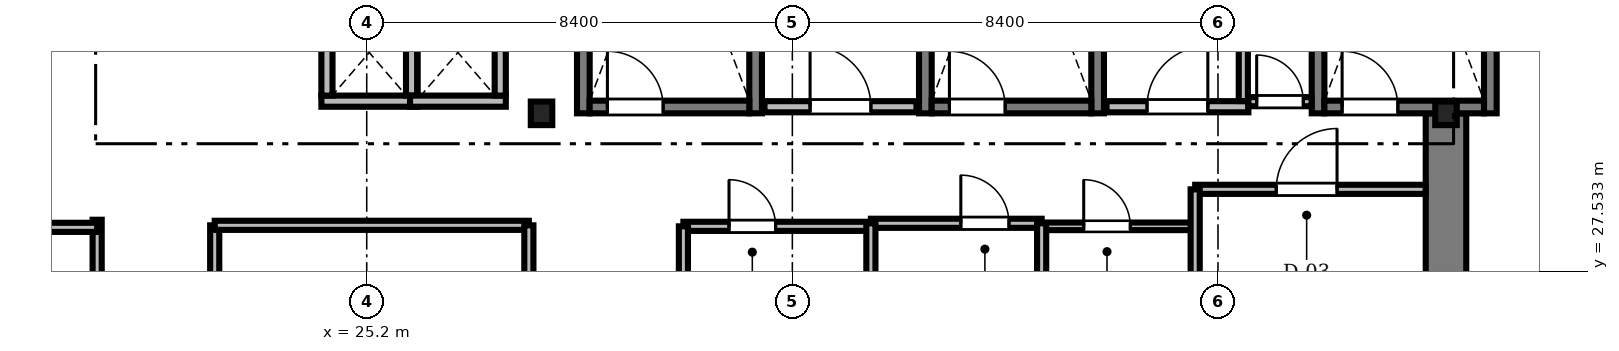
"""IFC4 building model, lengths in metres.
Left out: names, types, materials, properties, quantities, classifications, styles, units other than length and angle.
Written with IfcOpenShell. Run it as: python <this file> out.ifc"""

import sys

from ifc_helpers import new_model, si_unit, direction, frame, frame_2d, origin, origin_2d, place, context, subcontext, project, spatial, rectangle, i_section, extrude, source, transform, mapped, element, fill, save


model = new_model("IFC4")
c1 = context("Model", 3, precision=1e-05, world=origin(), true_north=direction((0.0, 1.0)))
c2 = subcontext(c1, "Body", "Model", "MODEL_VIEW")
j1 = project(units=[si_unit("LENGTHUNIT", "METRE"), si_unit("PLANEANGLEUNIT", "RADIAN")], contexts=[c1])
p1 = place(None, origin())
s1 = spatial("IfcSite", under=j1, at=p1, CompositionType="ELEMENT")
p2 = place(p1, origin())
s2 = spatial("IfcBuilding", under=s1, at=p2, CompositionType="ELEMENT")
p3 = place(p2, frame((0.0, 0.0, 126.1)))
s3 = spatial("IfcBuildingStorey", under=s2, at=p3, CompositionType="ELEMENT", Elevation=126.1)
m1 = source(origin(), c2, "Body", "SweptSolid", [
    extrude(rectangle(XDim=13.15, YDim=0.8, at=frame_2d((6.575, 0.0))), origin(), (0.0, 0.0, 1.0), 3.46),
])
p4 = place(p3, frame((46.5, 17.5, 0.0), z_axis=(0.0, 0.0, 1.0), x_axis=(0.0, 1.0, 0.0)))
e1 = element("IfcWall", 1, at=p4, inside=s3, PredefinedType="SHEAR", context=c2, shape_type="MappedRepresentation", body=[
    mapped(m1, transform((0.0, 0.0, 0.0), scale=1.0)),
])
m2 = source(origin(), c2, "Body", "SweptSolid", [
    extrude(i_section(OverallWidth=0.424, OverallDepth=0.465, WebThickness=0.035, FlangeThickness=0.056, FilletRadius=0.015, at=origin_2d()), origin(), (0.0, 0.0, 1.0), 3.46),
])
for number, where, z_axis, x_axis in (
    (2, (28.65, 30.65, 0.0), (0.0, 0.0, 1.0), (1.0, 0.0, 0.0)),
    (3, (46.5, 30.65, 0.0), (0.0, 0.0, 1.0), (1.0, 0.0, 0.0)),
):
    element("IfcColumn", number, at=place(p3, frame(where, z_axis=z_axis, x_axis=x_axis)), inside=s3, PredefinedType="COLUMN", context=c2, shape_type="MappedRepresentation", body=[
        mapped(m2, transform((0.0, 0.0, 0.0), scale=1.0)),
    ])
m3 = source(origin(), c2, "Body", "SweptSolid", [
    extrude(rectangle(XDim=9.25, YDim=0.25, at=frame_2d((4.625, 0.0))), origin(), (0.0, 0.0, 1.0), 3.5),
])
for number, where, z_axis, x_axis in (
    (4, (29.475, 30.65, 0.0), (0.0, 0.0, 1.0), (0.0, 1.0, 0.0)),
    (5, (32.875, 30.65, 0.0), (0.0, 0.0, 1.0), (0.0, 1.0, 0.0)),
):
    element("IfcWall", number, at=place(p3, frame(where, z_axis=z_axis, x_axis=x_axis)), inside=s3, PredefinedType="SOLIDWALL", context=c2, shape_type="MappedRepresentation", body=[
        mapped(m3, transform((0.0, 0.0, 0.0), scale=1.0)),
    ])
m4 = source(origin(), c2, "Body", "SweptSolid", [
    extrude(rectangle(XDim=3.15, YDim=0.25, at=frame_2d((1.575, 0.0))), origin(), (0.0, 0.0, 1.0), 3.5),
])
p5 = place(p3, frame((29.6, 30.775, 0.0), z_axis=(0.0, 0.0, 1.0), x_axis=(1.0, 0.0, 0.0)))
e6 = element("IfcWall", 6, at=p5, inside=s3, PredefinedType="SOLIDWALL", context=c2, shape_type="MappedRepresentation", body=[
    mapped(m4, transform((0.0, 0.0, 0.0), scale=1.0)),
])
m5 = source(origin(), c2, "Body", "SweptSolid", [
    extrude(rectangle(XDim=1.1, YDim=2.2, at=frame_2d((0.55, 1.1))), frame((0.0, 0.135, 0.0), z_axis=(0.0, -1.0, 0.0), x_axis=(1.0, 0.0, 0.0)), (0.0, 0.0, 1.0), 0.27),
])
p6 = place(p5, frame((0.35, 0.0, 0.0)))
e7 = element("IfcOpeningElement", 7, at=p6, cuts=e6, PredefinedType="OPENING", context=c2, shape_type="MappedRepresentation", body=[
    mapped(m5, transform((0.0, 0.0, 0.0), scale=1.0)),
])
for number, where, z_axis, x_axis in (
    (8, (36.225, 30.65, 0.0), (0.0, 0.0, 1.0), (0.0, 1.0, 0.0)),
    (9, (39.625, 30.65, 0.0), (0.0, 0.0, 1.0), (0.0, 1.0, 0.0)),
):
    element("IfcWall", number, at=place(p3, frame(where, z_axis=z_axis, x_axis=x_axis)), inside=s3, PredefinedType="SOLIDWALL", context=c2, shape_type="MappedRepresentation", body=[
        mapped(m3, transform((0.0, 0.0, 0.0), scale=1.0)),
    ])
p7 = place(p3, frame((36.35, 30.775, 0.0), z_axis=(0.0, 0.0, 1.0), x_axis=(1.0, 0.0, 0.0)))
e10 = element("IfcWall", 10, at=p7, inside=s3, PredefinedType="SOLIDWALL", context=c2, shape_type="MappedRepresentation", body=[
    mapped(m4, transform((0.0, 0.0, 0.0), scale=1.0)),
])
p8 = place(p7, frame((0.35, 0.0, 0.0)))
e11 = element("IfcOpeningElement", 11, at=p8, cuts=e10, PredefinedType="OPENING", context=c2, shape_type="MappedRepresentation", body=[
    mapped(m5, transform((0.0, 0.0, 0.0), scale=1.0)),
])
for number, where, z_axis, x_axis in (
    (12, (43.975, 30.65, 0.0), (0.0, 0.0, 1.0), (0.0, 1.0, 0.0)),
    (13, (47.375, 30.65, 0.0), (0.0, 0.0, 1.0), (0.0, 1.0, 0.0)),
):
    element("IfcWall", number, at=place(p3, frame(where, z_axis=z_axis, x_axis=x_axis)), inside=s3, PredefinedType="SOLIDWALL", context=c2, shape_type="MappedRepresentation", body=[
        mapped(m3, transform((0.0, 0.0, 0.0), scale=1.0)),
    ])
p9 = place(p3, frame((44.1, 30.775, 0.0), z_axis=(0.0, 0.0, 1.0), x_axis=(1.0, 0.0, 0.0)))
e14 = element("IfcWall", 14, at=p9, inside=s3, PredefinedType="SOLIDWALL", context=c2, shape_type="MappedRepresentation", body=[
    mapped(m4, transform((0.0, 0.0, 0.0), scale=1.0)),
])
p10 = place(p9, frame((0.35, 0.0, 0.0)))
e15 = element("IfcOpeningElement", 15, at=p10, cuts=e14, PredefinedType="OPENING", context=c2, shape_type="MappedRepresentation", body=[
    mapped(m5, transform((0.0, 0.0, 0.0), scale=1.0)),
])
m6 = source(origin(), c2, "Body", "SweptSolid", [
    extrude(rectangle(XDim=3.0, YDim=0.22, at=frame_2d((1.5, 0.0))), origin(), (0.0, 0.0, 1.0), 3.46),
])
p11 = place(p3, frame((33.05, 30.78, 0.0), z_axis=(0.0, 0.0, 1.0), x_axis=(1.0, 0.0, 0.0)))
e16 = element("IfcWall", 16, at=p11, inside=s3, PredefinedType="SOLIDWALL", context=c2, shape_type="MappedRepresentation", body=[
    mapped(m6, transform((0.0, 0.0, 0.0), scale=1.0)),
])
m7 = source(origin(), c2, "Body", "SweptSolid", [
    extrude(rectangle(XDim=1.2, YDim=2.2, at=frame_2d((0.6, 1.1))), frame((0.0, 0.12, 0.0), z_axis=(0.0, -1.0, 0.0), x_axis=(1.0, 0.0, 0.0)), (0.0, 0.0, 1.0), 0.24),
])
p12 = place(p11, frame((0.9, 0.0, 0.0)))
e17 = element("IfcOpeningElement", 17, at=p12, cuts=e16, PredefinedType="OPENING", context=c2, shape_type="MappedRepresentation", body=[
    mapped(m7, transform((0.0, 0.0, 0.0), scale=1.0)),
])
m8 = source(origin(), c2, "Body", "SweptSolid", [
    extrude(rectangle(XDim=2.8, YDim=0.22, at=frame_2d((1.4, 0.0))), origin(), (0.0, 0.0, 1.0), 3.46),
])
p13 = place(p3, frame((39.8, 30.78, 0.0), z_axis=(0.0, 0.0, 1.0), x_axis=(1.0, 0.0, 0.0)))
e18 = element("IfcWall", 18, at=p13, inside=s3, PredefinedType="SOLIDWALL", context=c2, shape_type="MappedRepresentation", body=[
    mapped(m8, transform((0.0, 0.0, 0.0), scale=1.0)),
])
p14 = place(p13, frame((0.8, 0.0, 0.0)))
e19 = element("IfcOpeningElement", 19, at=p14, cuts=e18, PredefinedType="OPENING", context=c2, shape_type="MappedRepresentation", body=[
    mapped(m7, transform((0.0, 0.0, 0.0), scale=1.0)),
])
m9 = source(origin(), c2, "Body", "SweptSolid", [
    extrude(rectangle(XDim=1.89, YDim=0.22, at=frame_2d((0.945, 0.0))), origin(), (0.0, 0.0, 1.0), 3.46),
])
p15 = place(p3, frame((24.305, 30.89, 0.0), z_axis=(0.0, 0.0, 1.0), x_axis=(1.0, 0.0, 0.0)))
e20 = element("IfcWall", 20, at=p15, inside=s3, PredefinedType="SOLIDWALL", context=c2, shape_type="MappedRepresentation", body=[
    mapped(m9, transform((0.0, 0.0, 0.0), scale=1.0)),
])
m10 = source(origin(), c2, "Body", "SweptSolid", [
    extrude(rectangle(XDim=1.7, YDim=0.22, at=frame_2d((0.85, 0.0))), origin(), (0.0, 0.0, 1.0), 3.46),
])
for number, where, z_axis, x_axis in (
    (21, (24.415, 31.0, 0.0), (0.0, 0.0, 1.0), (0.0, 1.0, 0.0)),
    (22, (26.085, 31.0, 0.0), (0.0, 0.0, 1.0), (0.0, 1.0, 0.0)),
):
    element("IfcWall", number, at=place(p3, frame(where, z_axis=z_axis, x_axis=x_axis)), inside=s3, PredefinedType="SOLIDWALL", context=c2, shape_type="MappedRepresentation", body=[
        mapped(m10, transform((0.0, 0.0, 0.0), scale=1.0)),
    ])
p16 = place(p3, frame((26.055, 30.89, 0.0), z_axis=(0.0, 0.0, 1.0), x_axis=(1.0, 0.0, 0.0)))
e23 = element("IfcWall", 23, at=p16, inside=s3, PredefinedType="SOLIDWALL", context=c2, shape_type="MappedRepresentation", body=[
    mapped(m9, transform((0.0, 0.0, 0.0), scale=1.0)),
])
p17 = place(p3, frame((27.835, 31.0, 0.0), z_axis=(0.0, 0.0, 1.0), x_axis=(0.0, 1.0, 0.0)))
e24 = element("IfcWall", 24, at=p17, inside=s3, PredefinedType="SOLIDWALL", context=c2, shape_type="MappedRepresentation", body=[
    mapped(m10, transform((0.0, 0.0, 0.0), scale=1.0)),
])
m11 = source(origin(), c2, "Body", "SweptSolid", [
    extrude(rectangle(XDim=4.548, YDim=0.18, at=frame_2d((2.274, 0.0))), origin(), (0.0, 0.0, 1.0), 3.092),
])
p18 = place(p3, frame((41.55, 29.15, 0.0), z_axis=(0.0, 0.0, 1.0), x_axis=(1.0, 0.0, 0.0)))
e25 = element("IfcWall", 25, at=p18, inside=s3, PredefinedType="PARTITIONING", context=c2, shape_type="MappedRepresentation", body=[
    mapped(m11, transform((0.0, 0.0, 0.0), scale=1.0)),
])
m12 = source(origin(), c2, "Body", "SweptSolid", [
    extrude(rectangle(XDim=1.2, YDim=2.2, at=frame_2d((0.6, 1.1))), frame((0.0, 0.1, 0.0), z_axis=(0.0, -1.0, 0.0), x_axis=(1.0, 0.0, 0.0)), (0.0, 0.0, 1.0), 0.2),
])
p19 = place(p18, frame((1.6, 0.0, 0.0)))
e26 = element("IfcOpeningElement", 26, at=p19, cuts=e25, PredefinedType="OPENING", context=c2, shape_type="MappedRepresentation", body=[
    mapped(m12, transform((0.0, 0.0, 0.0), scale=1.0)),
])
m13 = source(origin(), c2, "Body", "SweptSolid", [
    extrude(rectangle(XDim=4.24, YDim=0.18, at=frame_2d((2.12, 0.0))), origin(), (0.0, 0.0, 1.0), 2.852),
])
p20 = place(p3, frame((22.2, 24.2, 0.0), z_axis=(0.0, 0.0, 1.0), x_axis=(0.0, 1.0, 0.0)))
e27 = element("IfcWall", 27, at=p20, inside=s3, PredefinedType="PARTITIONING", context=c2, shape_type="MappedRepresentation", body=[
    mapped(m13, transform((0.0, 0.0, 0.0), scale=1.0)),
])
m14 = source(origin(), c2, "Body", "SweptSolid", [
    extrude(rectangle(XDim=1.05, YDim=2.2, at=frame_2d((0.525, 1.1))), frame((0.0, 0.1, 0.0), z_axis=(0.0, -1.0, 0.0), x_axis=(1.0, 0.0, 0.0)), (0.0, 0.0, 1.0), 0.2),
])
p21 = place(p20, frame((1.4, 0.0, 0.0)))
e28 = element("IfcOpeningElement", 28, at=p21, cuts=e27, PredefinedType="OPENING", context=c2, shape_type="MappedRepresentation", body=[
    mapped(m14, transform((0.0, 0.0, 0.0), scale=1.0)),
])
m15 = source(origin(), c2, "Body", "SweptSolid", [
    extrude(rectangle(XDim=3.7, YDim=0.18, at=frame_2d((1.85, 0.0))), origin(), (0.0, 0.0, 1.0), 3.092),
])
p22 = place(p3, frame((31.45, 28.42, 0.0), z_axis=(0.0, 0.0, 1.0), x_axis=(1.0, 0.0, 0.0)))
e29 = element("IfcWall", 29, at=p22, inside=s3, PredefinedType="PARTITIONING", context=c2, shape_type="MappedRepresentation", body=[
    mapped(m15, transform((0.0, 0.0, 0.0), scale=1.0)),
])
m16 = source(origin(), c2, "Body", "SweptSolid", [
    extrude(rectangle(XDim=0.92, YDim=2.1, at=frame_2d((0.46, 1.05))), frame((0.0, 0.1, 0.0), z_axis=(0.0, -1.0, 0.0), x_axis=(1.0, 0.0, 0.0)), (0.0, 0.0, 1.0), 0.2),
])
p23 = place(p22, frame((0.9, 0.0, 0.0)))
e30 = element("IfcOpeningElement", 30, at=p23, cuts=e29, PredefinedType="OPENING", context=c2, shape_type="MappedRepresentation", body=[
    mapped(m16, transform((0.0, 0.0, 0.0), scale=1.0)),
])
m17 = source(origin(), c2, "Body", "SweptSolid", [
    extrude(rectangle(XDim=3.37, YDim=0.18, at=frame_2d((1.685, 0.0))), origin(), (0.0, 0.0, 1.0), 3.46),
])
p24 = place(p3, frame((35.15, 28.48, 0.0), z_axis=(0.0, 0.0, 1.0), x_axis=(1.0, 0.0, 0.0)))
e31 = element("IfcWall", 31, at=p24, inside=s3, PredefinedType="PARTITIONING", context=c2, shape_type="MappedRepresentation", body=[
    mapped(m17, transform((0.0, 0.0, 0.0), scale=1.0)),
])
m18 = source(origin(), c2, "Body", "SweptSolid", [
    extrude(rectangle(XDim=0.95, YDim=2.15, at=frame_2d((0.475, 1.075))), frame((0.0, 0.1, 0.0), z_axis=(0.0, -1.0, 0.0), x_axis=(1.0, 0.0, 0.0)), (0.0, 0.0, 1.0), 0.2),
])
p25 = place(p24, frame((1.775, 0.0, 0.0)))
e32 = element("IfcOpeningElement", 32, at=p25, cuts=e31, PredefinedType="OPENING", context=c2, shape_type="MappedRepresentation", body=[
    mapped(m18, transform((0.0, 0.0, 0.0), scale=1.0)),
])
m19 = source(origin(), c2, "Body", "SweptSolid", [
    extrude(rectangle(XDim=3.0, YDim=0.15, at=frame_2d((1.5, 0.0))), origin(), (0.0, 0.0, 1.0), 3.46),
])
p26 = place(p3, frame((38.52, 28.42, 0.0), z_axis=(0.0, 0.0, 1.0), x_axis=(1.0, 0.0, 0.0)))
e33 = element("IfcWall", 33, at=p26, inside=s3, PredefinedType="PARTITIONING", context=c2, shape_type="MappedRepresentation", body=[
    mapped(m19, transform((0.0, 0.0, 0.0), scale=1.0)),
])
m20 = source(origin(), c2, "Body", "SweptSolid", [
    extrude(rectangle(XDim=0.92, YDim=2.1, at=frame_2d((0.46, 1.05))), frame((0.0, 0.085, 0.0), z_axis=(0.0, -1.0, 0.0), x_axis=(1.0, 0.0, 0.0)), (0.0, 0.0, 1.0), 0.17),
])
p27 = place(p26, frame((0.83, 0.0, 0.0)))
e34 = element("IfcOpeningElement", 34, at=p27, cuts=e33, PredefinedType="OPENING", context=c2, shape_type="MappedRepresentation", body=[
    mapped(m20, transform((0.0, 0.0, 0.0), scale=1.0)),
])
m21 = source(origin(), c2, "Body", "SweptSolid", [
    extrude(rectangle(XDim=1.248, YDim=0.18, at=frame_2d((0.624, 0.0))), origin(), (0.0, 0.0, 1.0), 3.46),
])
p28 = place(p3, frame((42.6, 30.88, 0.0), z_axis=(0.0, 0.0, 1.0), x_axis=(1.0, 0.0, 0.0)))
e35 = element("IfcWall", 35, at=p28, inside=s3, PredefinedType="PARTITIONING", context=c2, shape_type="MappedRepresentation", body=[
    mapped(m21, transform((0.0, 0.0, 0.0), scale=1.0)),
])
p29 = place(p28, frame((0.164, 0.0, 0.0)))
e36 = element("IfcOpeningElement", 36, at=p29, cuts=e35, PredefinedType="OPENING", context=c2, shape_type="MappedRepresentation", body=[
    mapped(m16, transform((0.0, 0.0, 0.0), scale=1.0)),
])
m22 = source(origin(), c2, "Body", "SweptSolid", [
    extrude(rectangle(XDim=14.45, YDim=0.18, at=frame_2d((7.225, 0.0))), origin(), (0.0, 0.0, 1.0), 2.852),
])
p30 = place(p3, frame((19.88, 14.1, 0.0), z_axis=(0.0, 0.0, 1.0), x_axis=(0.0, 1.0, 0.0)))
e37 = element("IfcWall", 37, at=p30, inside=s3, PredefinedType="PARTITIONING", context=c2, shape_type="MappedRepresentation", body=[
    mapped(m22, transform((0.0, 0.0, 0.0), scale=1.0)),
])
m23 = source(origin(), c2, "Body", "SweptSolid", [
    extrude(rectangle(XDim=13.15, YDim=0.18, at=frame_2d((6.575, 0.0))), origin(), (0.0, 0.0, 1.0), 2.702),
])
p31 = place(p3, frame((6.73, 28.4, 0.0), z_axis=(0.0, 0.0, 1.0), x_axis=(1.0, 0.0, 0.0)))
e38 = element("IfcWall", 38, at=p31, inside=s3, PredefinedType="PARTITIONING", context=c2, shape_type="MappedRepresentation", body=[
    mapped(m23, transform((0.0, 0.0, 0.0), scale=1.0)),
])
m24 = source(origin(), c2, "Body", "SweptSolid", [
    extrude(rectangle(XDim=6.2, YDim=0.18, at=frame_2d((3.1, 0.0))), origin(), (0.0, 0.0, 1.0), 3.46),
])
p32 = place(p3, frame((22.2, 28.44, 0.0), z_axis=(0.0, 0.0, 1.0), x_axis=(1.0, 0.0, 0.0)))
e39 = element("IfcWall", 39, at=p32, inside=s3, PredefinedType="PARTITIONING", context=c2, shape_type="MappedRepresentation", body=[
    mapped(m24, transform((0.0, 0.0, 0.0), scale=1.0)),
])
p33 = place(p3, frame((28.4, 24.2, 0.0), z_axis=(0.0, 0.0, 1.0), x_axis=(0.0, 1.0, 0.0)))
e40 = element("IfcWall", 40, at=p33, inside=s3, PredefinedType="PARTITIONING", context=c2, shape_type="MappedRepresentation", body=[
    mapped(m13, transform((0.0, 0.0, 0.0), scale=1.0)),
])
m25 = source(origin(), c2, "Body", "SweptSolid", [
    extrude(rectangle(XDim=2.35, YDim=0.18, at=frame_2d((1.175, 0.0))), origin(), (0.0, 0.0, 1.0), 2.852),
])
p34 = place(p3, frame((41.55, 26.8, 0.0), z_axis=(0.0, 0.0, 1.0), x_axis=(0.0, 1.0, 0.0)))
e41 = element("IfcWall", 41, at=p34, inside=s3, PredefinedType="PARTITIONING", context=c2, shape_type="MappedRepresentation", body=[
    mapped(m25, transform((0.0, 0.0, 0.0), scale=1.0)),
])
m26 = source(origin(), c2, "Body", "SweptSolid", [
    extrude(rectangle(XDim=1.858, YDim=0.18, at=frame_2d((0.929, 0.0))), origin(), (0.0, 0.0, 1.0), 3.46),
])
p35 = place(p3, frame((42.5, 30.892, 0.0), z_axis=(0.0, 0.0, 1.0), x_axis=(0.0, 1.0, 0.0)))
e42 = element("IfcWall", 42, at=p35, inside=s3, PredefinedType="PARTITIONING", context=c2, shape_type="MappedRepresentation", body=[
    mapped(m26, transform((0.0, 0.0, 0.0), scale=1.0)),
])
m27 = source(origin(), c2, "Body", "SweptSolid", [
    extrude(rectangle(XDim=1.66, YDim=0.18, at=frame_2d((0.83, 0.0))), origin(), (0.0, 0.0, 1.0), 3.002),
])
for number, where, z_axis, x_axis in (
    (43, (35.15, 26.82, 0.0), (0.0, 0.0, 1.0), (0.0, 1.0, 0.0)),
    (44, (38.52, 26.82, 0.0), (0.0, 0.0, 1.0), (0.0, 1.0, 0.0)),
):
    element("IfcWall", number, at=place(p3, frame(where, z_axis=z_axis, x_axis=x_axis)), inside=s3, PredefinedType="PARTITIONING", context=c2, shape_type="MappedRepresentation", body=[
        mapped(m27, transform((0.0, 0.0, 0.0), scale=1.0)),
    ])
m28 = source(origin(), c2, "Body", "SweptSolid", [
    extrude(rectangle(XDim=1.6, YDim=0.18, at=frame_2d((0.8, 0.0))), origin(), (0.0, 0.0, 1.0), 3.002),
])
p36 = place(p3, frame((31.45, 26.82, 0.0), z_axis=(0.0, 0.0, 1.0), x_axis=(0.0, 1.0, 0.0)))
e45 = element("IfcWall", 45, at=p36, inside=s3, PredefinedType="PARTITIONING", context=c2, shape_type="MappedRepresentation", body=[
    mapped(m28, transform((0.0, 0.0, 0.0), scale=1.0)),
])
m29 = source(origin(), c2, "Body", "SweptSolid", [
    extrude(rectangle(XDim=1.1, YDim=2.2, at=frame_2d((0.55, 1.1))), frame((0.0, 0.025, 0.0), z_axis=(0.0, -1.0, 0.0), x_axis=(1.0, 0.0, 0.0)), (0.0, 0.0, 1.0), 0.05),
])
p37 = place(p6, origin())
e46 = element("IfcDoor", 46, at=p37, inside=s3, OperationType="SINGLE_SWING_LEFT", PredefinedType="DOOR", context=c2, shape_type="MappedRepresentation", body=[
    mapped(m29, transform((0.0, 0.0, 0.0), scale=1.0)),
])
fill(e7, e46)
p38 = place(p8, origin())
e47 = element("IfcDoor", 47, at=p38, inside=s3, OperationType="SINGLE_SWING_LEFT", PredefinedType="DOOR", context=c2, shape_type="MappedRepresentation", body=[
    mapped(m29, transform((0.0, 0.0, 0.0), scale=1.0)),
])
fill(e11, e47)
p39 = place(p10, origin())
e48 = element("IfcDoor", 48, at=p39, inside=s3, OperationType="SINGLE_SWING_LEFT", PredefinedType="DOOR", context=c2, shape_type="MappedRepresentation", body=[
    mapped(m29, transform((0.0, 0.0, 0.0), scale=1.0)),
])
fill(e15, e48)
m30 = source(origin(), c2, "Body", "SweptSolid", [
    extrude(rectangle(XDim=1.2, YDim=2.2, at=frame_2d((0.6, 1.1))), frame((0.0, 0.025, 0.0), z_axis=(0.0, -1.0, 0.0), x_axis=(1.0, 0.0, 0.0)), (0.0, 0.0, 1.0), 0.05),
])
p40 = place(p12, origin())
e49 = element("IfcDoor", 49, at=p40, inside=s3, OperationType="SINGLE_SWING_LEFT", PredefinedType="DOOR", context=c2, shape_type="MappedRepresentation", body=[
    mapped(m30, transform((0.0, 0.0, 0.0), scale=1.0)),
])
fill(e17, e49)
p41 = place(p14, origin())
e50 = element("IfcDoor", 50, at=p41, inside=s3, OperationType="SINGLE_SWING_RIGHT", PredefinedType="DOOR", context=c2, shape_type="MappedRepresentation", body=[
    mapped(m30, transform((0.0, 0.0, 0.0), scale=1.0)),
])
fill(e19, e50)
p42 = place(p19, origin())
e51 = element("IfcDoor", 51, at=p42, inside=s3, OperationType="SINGLE_SWING_RIGHT", PredefinedType="DOOR", context=c2, shape_type="MappedRepresentation", body=[
    mapped(m30, transform((0.0, 0.0, 0.0), scale=1.0)),
])
fill(e26, e51)
m31 = source(origin(), c2, "Body", "SweptSolid", [
    extrude(rectangle(XDim=0.92, YDim=2.1, at=frame_2d((0.46, 1.05))), frame((0.0, 0.025, 0.0), z_axis=(0.0, -1.0, 0.0), x_axis=(1.0, 0.0, 0.0)), (0.0, 0.0, 1.0), 0.05),
])
p43 = place(p23, origin())
e52 = element("IfcDoor", 52, at=p43, inside=s3, OperationType="SINGLE_SWING_LEFT", PredefinedType="DOOR", context=c2, shape_type="MappedRepresentation", body=[
    mapped(m31, transform((0.0, 0.0, 0.0), scale=1.0)),
])
fill(e30, e52)
m32 = source(origin(), c2, "Body", "SweptSolid", [
    extrude(rectangle(XDim=0.95, YDim=2.15, at=frame_2d((0.475, 1.075))), frame((0.0, 0.025, 0.0), z_axis=(0.0, -1.0, 0.0), x_axis=(1.0, 0.0, 0.0)), (0.0, 0.0, 1.0), 0.05),
])
p44 = place(p25, origin())
e53 = element("IfcDoor", 53, at=p44, inside=s3, OperationType="SINGLE_SWING_LEFT", PredefinedType="DOOR", context=c2, shape_type="MappedRepresentation", body=[
    mapped(m32, transform((0.0, 0.0, 0.0), scale=1.0)),
])
fill(e32, e53)
p45 = place(p27, origin())
e54 = element("IfcDoor", 54, at=p45, inside=s3, OperationType="SINGLE_SWING_LEFT", PredefinedType="DOOR", context=c2, shape_type="MappedRepresentation", body=[
    mapped(m31, transform((0.0, 0.0, 0.0), scale=1.0)),
])
fill(e34, e54)
p46 = place(p29, origin())
e55 = element("IfcDoor", 55, at=p46, inside=s3, OperationType="SINGLE_SWING_LEFT", PredefinedType="DOOR", context=c2, shape_type="MappedRepresentation", body=[
    mapped(m31, transform((0.0, 0.0, 0.0), scale=1.0)),
])
fill(e36, e55)
save(model, sys.argv[1])
